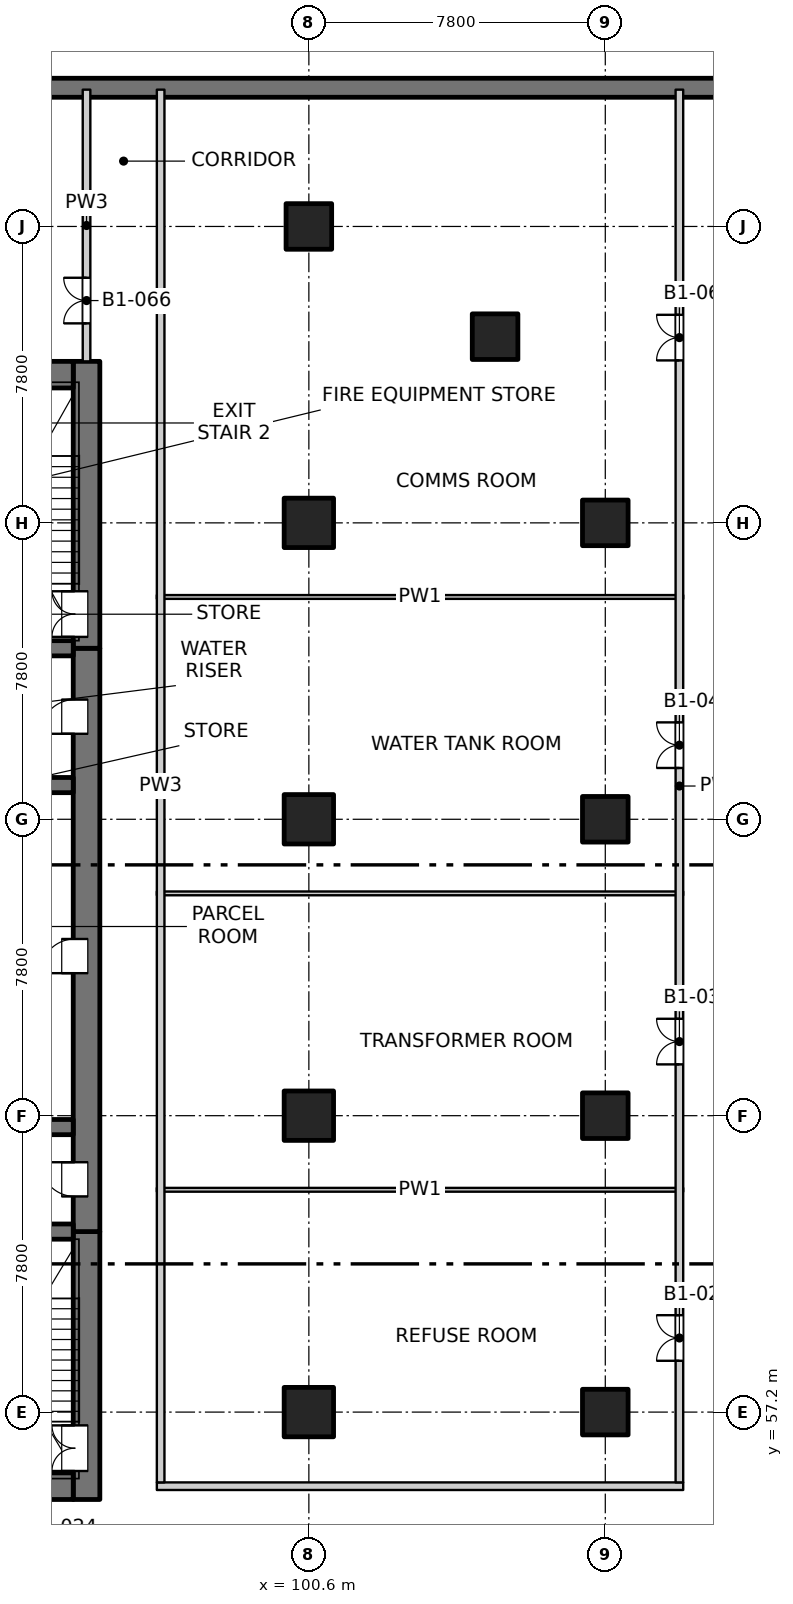
"""IFC4 building model, lengths in metres.
Left out: names, types, materials, properties, quantities, classifications, styles, units other than length and angle.
Written with IfcOpenShell. Run it as: python <this file> out.ifc"""

import sys

from ifc_helpers import new_model, si_unit, direction, frame, frame_2d, origin, origin_2d, place, context, subcontext, project, spatial, rectangle, extrude, element, fill, save


model = new_model("IFC4")
c1 = context("Model", 3, precision=1e-05, world=origin(), true_north=direction((0.0, 1.0)))
c2 = subcontext(c1, "Body", "Model", "MODEL_VIEW")
j1 = project(units=[si_unit("LENGTHUNIT", "METRE"), si_unit("PLANEANGLEUNIT", "RADIAN")], contexts=[c1])
p1 = place(None, origin())
s1 = spatial("IfcSite", under=j1, at=p1, CompositionType="ELEMENT")
p2 = place(p1, origin())
s2 = spatial("IfcBuilding", under=s1, at=p2, CompositionType="ELEMENT")
p3 = place(p2, frame((0.0, 0.0, -4.5)))
s3 = spatial("IfcBuildingStorey", under=s2, at=p3, CompositionType="ELEMENT", Elevation=-4.5)
p4 = place(p3, frame((42.6, 92.05, -0.35), z_axis=(0.0, 0.0, 1.0), x_axis=(1.0, 0.0, 0.0)))
e1 = element("IfcWall", 1, at=p4, inside=s3, PredefinedType="SOLIDWALL", context=c2, shape_type="SweptSolid", body=[
    extrude(rectangle(XDim=84.8, YDim=0.5, at=frame_2d((42.4, 0.0))), origin(), (0.0, 0.0, 1.0), 4.45),
])
for number, where, z_axis, x_axis in (
    (2, (105.5, 85.5, -0.35), (0.0, 0.0, 1.0), (1.0, 0.0, 0.0)),
    (3, (108.4, 57.2, -0.35), (0.0, 0.0, 1.0), (1.0, 0.0, 0.0)),
    (4, (108.4, 65.0, -0.35), (0.0, 0.0, 1.0), (1.0, 0.0, 0.0)),
    (5, (108.4, 72.8, -0.35), (0.0, 0.0, 1.0), (1.0, 0.0, 0.0)),
    (6, (108.4, 80.6, -0.35), (0.0, 0.0, 1.0), (1.0, 0.0, 0.0)),
    (7, (100.6, 88.4, -0.35), (0.0, 0.0, 1.0), (1.0, 0.0, 0.0)),
):
    element("IfcColumn", number, at=place(p3, frame(where, z_axis=z_axis, x_axis=x_axis)), inside=s3, PredefinedType="COLUMN", context=c2, shape_type="SweptSolid", body=[
        extrude(rectangle(XDim=1.2, YDim=1.2, at=origin_2d()), origin(), (0.0, 0.0, 1.0), 4.45),
    ])
for number, where, z_axis, x_axis in (
    (8, (100.6, 57.2, -0.35), (0.0, 0.0, 1.0), (1.0, 0.0, 0.0)),
    (9, (100.6, 65.0, -0.35), (0.0, 0.0, 1.0), (1.0, 0.0, 0.0)),
    (10, (100.6, 72.8, -0.35), (0.0, 0.0, 1.0), (1.0, 0.0, 0.0)),
    (11, (100.6, 80.6, -0.35), (0.0, 0.0, 1.0), (1.0, 0.0, 0.0)),
):
    element("IfcColumn", number, at=place(p3, frame(where, z_axis=z_axis, x_axis=x_axis)), inside=s3, PredefinedType="COLUMN", context=c2, shape_type="SweptSolid", body=[
        extrude(rectangle(XDim=1.3, YDim=1.3, at=origin_2d()), origin(), (0.0, 0.0, 1.0), 4.45),
    ])
p5 = place(p3, frame((94.75, 54.9, -0.35), z_axis=(0.0, 0.0, 1.0), x_axis=(0.0, 1.0, 0.0)))
e12 = element("IfcWall", 12, at=p5, inside=s3, PredefinedType="SOLIDWALL", context=c2, shape_type="SweptSolid", body=[
    extrude(rectangle(XDim=7.05, YDim=0.7, at=frame_2d((3.525, 0.0))), origin(), (0.0, 0.0, 1.0), 4.45),
])
p6 = place(p5, frame((0.75, 0.0, 0.35)))
e13 = element("IfcOpeningElement", 13, at=p6, cuts=e12, PredefinedType="OPENING", context=c2, shape_type="SweptSolid", body=[
    extrude(rectangle(XDim=1.2, YDim=2.1, at=frame_2d((0.6, 1.05))), frame((0.0, 0.36, 0.0), z_axis=(0.0, -1.0, 0.0), x_axis=(1.0, 0.0, 0.0)), (0.0, 0.0, 1.0), 0.72),
])
p7 = place(p3, frame((94.75, 61.95, -0.35), z_axis=(0.0, 0.0, 1.0), x_axis=(0.0, 1.0, 0.0)))
e14 = element("IfcWall", 14, at=p7, inside=s3, PredefinedType="SOLIDWALL", context=c2, shape_type="SweptSolid", body=[
    extrude(rectangle(XDim=15.35, YDim=0.7, at=frame_2d((7.675, 0.0))), origin(), (0.0, 0.0, 1.0), 4.45),
])
p8 = place(p7, frame((0.925, 0.0, 0.35)))
e15 = element("IfcOpeningElement", 15, at=p8, cuts=e14, PredefinedType="OPENING", context=c2, shape_type="SweptSolid", body=[
    extrude(rectangle(XDim=0.9, YDim=2.1, at=frame_2d((0.45, 1.05))), frame((0.0, 0.36, 0.0), z_axis=(0.0, -1.0, 0.0), x_axis=(1.0, 0.0, 0.0)), (0.0, 0.0, 1.0), 0.72),
])
p9 = place(p7, frame((6.8, 0.0, 0.35)))
e16 = element("IfcOpeningElement", 16, at=p9, cuts=e14, PredefinedType="OPENING", context=c2, shape_type="SweptSolid", body=[
    extrude(rectangle(XDim=0.9, YDim=2.1, at=frame_2d((0.45, 1.05))), frame((0.0, 0.36, 0.0), z_axis=(0.0, -1.0, 0.0), x_axis=(1.0, 0.0, 0.0)), (0.0, 0.0, 1.0), 0.72),
])
p10 = place(p7, frame((13.1, 0.0, 0.35)))
e17 = element("IfcOpeningElement", 17, at=p10, cuts=e14, PredefinedType="OPENING", context=c2, shape_type="SweptSolid", body=[
    extrude(rectangle(XDim=0.9, YDim=2.1, at=frame_2d((0.45, 1.05))), frame((0.0, 0.36, 0.0), z_axis=(0.0, -1.0, 0.0), x_axis=(1.0, 0.0, 0.0)), (0.0, 0.0, 1.0), 0.72),
])
p11 = place(p3, frame((94.75, 77.3, -0.35), z_axis=(0.0, 0.0, 1.0), x_axis=(0.0, 1.0, 0.0)))
e18 = element("IfcWall", 18, at=p11, inside=s3, PredefinedType="SOLIDWALL", context=c2, shape_type="SweptSolid", body=[
    extrude(rectangle(XDim=7.55, YDim=0.7, at=frame_2d((3.775, 0.0))), origin(), (0.0, 0.0, 1.0), 4.45),
])
p12 = place(p11, frame((0.3, 0.0, 0.35)))
e19 = element("IfcOpeningElement", 19, at=p12, cuts=e18, PredefinedType="OPENING", context=c2, shape_type="SweptSolid", body=[
    extrude(rectangle(XDim=1.2, YDim=2.1, at=frame_2d((0.6, 1.05))), frame((0.0, 0.36, 0.0), z_axis=(0.0, -1.0, 0.0), x_axis=(1.0, 0.0, 0.0)), (0.0, 0.0, 1.0), 0.72),
])
p13 = place(p3, frame((75.6, 55.25, -0.35), z_axis=(0.0, 0.0, 1.0), x_axis=(1.0, 0.0, 0.0)))
e20 = element("IfcWall", 20, at=p13, inside=s3, PredefinedType="SOLIDWALL", context=c2, shape_type="SweptSolid", body=[
    extrude(rectangle(XDim=18.8, YDim=0.7, at=frame_2d((9.4, 0.0))), origin(), (0.0, 0.0, 1.0), 4.45),
])
p14 = place(p13, frame((8.65, 0.0, 0.35)))
e21 = element("IfcOpeningElement", 21, at=p14, cuts=e20, PredefinedType="OPENING", context=c2, shape_type="SweptSolid", body=[
    extrude(rectangle(XDim=1.5, YDim=2.1, at=frame_2d((0.75, 1.05))), frame((0.0, 0.36, 0.0), z_axis=(0.0, -1.0, 0.0), x_axis=(1.0, 0.0, 0.0)), (0.0, 0.0, 1.0), 0.72),
])
p15 = place(p3, frame((75.6, 84.5, -0.35), z_axis=(0.0, 0.0, 1.0), x_axis=(1.0, 0.0, 0.0)))
e22 = element("IfcWall", 22, at=p15, inside=s3, PredefinedType="SOLIDWALL", context=c2, shape_type="SweptSolid", body=[
    extrude(rectangle(XDim=18.8, YDim=0.7, at=frame_2d((9.4, 0.0))), origin(), (0.0, 0.0, 1.0), 4.45),
])
for number, where, z_axis, x_axis in (
    (23, (90.75, 61.95, -0.35), (0.0, 0.0, 1.0), (1.0, 0.0, 0.0)),
    (24, (90.75, 64.7, -0.35), (0.0, 0.0, 1.0), (1.0, 0.0, 0.0)),
    (25, (90.75, 73.7, -0.35), (0.0, 0.0, 1.0), (1.0, 0.0, 0.0)),
    (26, (90.75, 77.3, -0.35), (0.0, 0.0, 1.0), (1.0, 0.0, 0.0)),
):
    element("IfcWall", number, at=place(p3, frame(where, z_axis=z_axis, x_axis=x_axis)), inside=s3, PredefinedType="SOLIDWALL", context=c2, shape_type="SweptSolid", body=[
        extrude(rectangle(XDim=3.65, YDim=0.4, at=frame_2d((1.825, 0.0))), origin(), (0.0, 0.0, 1.0), 4.45),
    ])
p16 = place(p3, frame((96.6, 55.25, 0.0), z_axis=(0.0, 0.0, 1.0), x_axis=(1.0, 0.0, 0.0)))
e27 = element("IfcWall", 27, at=p16, inside=s3, PredefinedType="PARTITIONING", context=c2, shape_type="SweptSolid", body=[
    extrude(rectangle(XDim=13.85, YDim=0.2, at=frame_2d((6.925, 0.0))), origin(), (0.0, 0.0, 1.0), 4.1),
])
for number, where, z_axis, x_axis in (
    (28, (96.6, 63.05, 0.0), (0.0, 0.0, 1.0), (1.0, 0.0, 0.0)),
    (29, (96.6, 70.85, 0.0), (0.0, 0.0, 1.0), (1.0, 0.0, 0.0)),
    (30, (96.6, 78.65, 0.0), (0.0, 0.0, 1.0), (1.0, 0.0, 0.0)),
):
    element("IfcWall", number, at=place(p3, frame(where, z_axis=z_axis, x_axis=x_axis)), inside=s3, PredefinedType="PARTITIONING", context=c2, shape_type="SweptSolid", body=[
        extrude(rectangle(XDim=13.85, YDim=0.1, at=frame_2d((6.925, 0.0))), origin(), (0.0, 0.0, 1.0), 4.1),
    ])
p17 = place(p3, frame((94.75, 84.85, 0.0), z_axis=(0.0, 0.0, 1.0), x_axis=(0.0, 1.0, 0.0)))
e31 = element("IfcWall", 31, at=p17, inside=s3, PredefinedType="PARTITIONING", context=c2, shape_type="SweptSolid", body=[
    extrude(rectangle(XDim=7.15, YDim=0.2, at=frame_2d((3.575, 0.0))), origin(), (0.0, 0.0, 1.0), 4.1),
])
p18 = place(p17, frame((1.0, 0.0, 0.0)))
e32 = element("IfcOpeningElement", 32, at=p18, cuts=e31, PredefinedType="OPENING", context=c2, shape_type="SweptSolid", body=[
    extrude(rectangle(XDim=1.2, YDim=2.1, at=frame_2d((0.6, 1.05))), frame((0.0, 0.11, 0.0), z_axis=(0.0, -1.0, 0.0), x_axis=(1.0, 0.0, 0.0)), (0.0, 0.0, 1.0), 0.22),
])
p19 = place(p3, frame((96.7, 55.35, 0.0), z_axis=(0.0, 0.0, 1.0), x_axis=(0.0, 1.0, 0.0)))
e33 = element("IfcWall", 33, at=p19, inside=s3, PredefinedType="PARTITIONING", context=c2, shape_type="SweptSolid", body=[
    extrude(rectangle(XDim=36.65, YDim=0.2, at=frame_2d((18.325, 0.0))), origin(), (0.0, 0.0, 1.0), 4.1),
])
p20 = place(p3, frame((110.35, 55.35, 0.0), z_axis=(0.0, 0.0, 1.0), x_axis=(0.0, 1.0, 0.0)))
e34 = element("IfcWall", 34, at=p20, inside=s3, PredefinedType="PARTITIONING", context=c2, shape_type="SweptSolid", body=[
    extrude(rectangle(XDim=36.65, YDim=0.2, at=frame_2d((18.325, 0.0))), origin(), (0.0, 0.0, 1.0), 4.1),
])
p21 = place(p20, frame((3.2, 0.0, 0.0)))
e35 = element("IfcOpeningElement", 35, at=p21, cuts=e34, PredefinedType="OPENING", context=c2, shape_type="SweptSolid", body=[
    extrude(rectangle(XDim=1.2, YDim=2.1, at=frame_2d((0.6, 1.05))), frame((0.0, 0.11, 0.0), z_axis=(0.0, -1.0, 0.0), x_axis=(1.0, 0.0, 0.0)), (0.0, 0.0, 1.0), 0.22),
])
p22 = place(p20, frame((11.0, 0.0, 0.0)))
e36 = element("IfcOpeningElement", 36, at=p22, cuts=e34, PredefinedType="OPENING", context=c2, shape_type="SweptSolid", body=[
    extrude(rectangle(XDim=1.2, YDim=2.1, at=frame_2d((0.6, 1.05))), frame((0.0, 0.11, 0.0), z_axis=(0.0, -1.0, 0.0), x_axis=(1.0, 0.0, 0.0)), (0.0, 0.0, 1.0), 0.22),
])
p23 = place(p20, frame((18.8, 0.0, 0.0)))
e37 = element("IfcOpeningElement", 37, at=p23, cuts=e34, PredefinedType="OPENING", context=c2, shape_type="SweptSolid", body=[
    extrude(rectangle(XDim=1.2, YDim=2.1, at=frame_2d((0.6, 1.05))), frame((0.0, 0.11, 0.0), z_axis=(0.0, -1.0, 0.0), x_axis=(1.0, 0.0, 0.0)), (0.0, 0.0, 1.0), 0.22),
])
p24 = place(p20, frame((29.525, 0.0, 0.0)))
e38 = element("IfcOpeningElement", 38, at=p24, cuts=e34, PredefinedType="OPENING", context=c2, shape_type="SweptSolid", body=[
    extrude(rectangle(XDim=1.2, YDim=2.1, at=frame_2d((0.6, 1.05))), frame((0.0, 0.11, 0.0), z_axis=(0.0, -1.0, 0.0), x_axis=(1.0, 0.0, 0.0)), (0.0, 0.0, 1.0), 0.22),
])
p25 = place(p6, origin())
e39 = element("IfcDoor", 39, at=p25, inside=s3, OperationType="DOUBLE_DOOR_SINGLE_SWING", PredefinedType="DOOR", context=c2, shape_type="SweptSolid", body=[
    extrude(rectangle(XDim=1.2, YDim=2.1, at=frame_2d((0.6, 1.05))), frame((0.0, 0.335, 0.0), z_axis=(0.0, -1.0, 0.0), x_axis=(1.0, 0.0, 0.0)), (0.0, 0.0, 1.0), 0.05),
])
fill(e13, e39)
p26 = place(p21, origin())
e40 = element("IfcDoor", 40, at=p26, inside=s3, OperationType="DOUBLE_DOOR_SINGLE_SWING", PredefinedType="DOOR", context=c2, shape_type="SweptSolid", body=[
    extrude(rectangle(XDim=1.2, YDim=2.1, at=frame_2d((0.6, 1.05))), frame((0.0, 0.025, 0.0), z_axis=(0.0, -1.0, 0.0), x_axis=(1.0, 0.0, 0.0)), (0.0, 0.0, 1.0), 0.05),
])
fill(e35, e40)
p27 = place(p8, origin())
e41 = element("IfcDoor", 41, at=p27, inside=s3, OperationType="SINGLE_SWING_RIGHT", PredefinedType="DOOR", context=c2, shape_type="SweptSolid", body=[
    extrude(rectangle(XDim=0.9, YDim=2.1, at=frame_2d((0.45, 1.05))), frame((0.0, 0.335, 0.0), z_axis=(0.0, -1.0, 0.0), x_axis=(1.0, 0.0, 0.0)), (0.0, 0.0, 1.0), 0.05),
])
fill(e15, e41)
p28 = place(p22, origin())
e42 = element("IfcDoor", 42, at=p28, inside=s3, OperationType="DOUBLE_DOOR_SINGLE_SWING", PredefinedType="DOOR", context=c2, shape_type="SweptSolid", body=[
    extrude(rectangle(XDim=1.2, YDim=2.1, at=frame_2d((0.6, 1.05))), frame((0.0, 0.025, 0.0), z_axis=(0.0, -1.0, 0.0), x_axis=(1.0, 0.0, 0.0)), (0.0, 0.0, 1.0), 0.05),
])
fill(e36, e42)
p29 = place(p9, origin())
e43 = element("IfcDoor", 43, at=p29, inside=s3, OperationType="SINGLE_SWING_LEFT", PredefinedType="DOOR", context=c2, shape_type="SweptSolid", body=[
    extrude(rectangle(XDim=0.9, YDim=2.1, at=frame_2d((0.45, 1.05))), frame((0.0, 0.335, 0.0), z_axis=(0.0, -1.0, 0.0), x_axis=(1.0, 0.0, 0.0)), (0.0, 0.0, 1.0), 0.05),
])
fill(e16, e43)
p30 = place(p23, origin())
e44 = element("IfcDoor", 44, at=p30, inside=s3, OperationType="DOUBLE_DOOR_SINGLE_SWING", PredefinedType="DOOR", context=c2, shape_type="SweptSolid", body=[
    extrude(rectangle(XDim=1.2, YDim=2.1, at=frame_2d((0.6, 1.05))), frame((0.0, 0.025, 0.0), z_axis=(0.0, -1.0, 0.0), x_axis=(1.0, 0.0, 0.0)), (0.0, 0.0, 1.0), 0.05),
])
fill(e37, e44)
p31 = place(p10, origin())
e45 = element("IfcDoor", 45, at=p31, inside=s3, OperationType="SINGLE_SWING_LEFT", PredefinedType="DOOR", context=c2, shape_type="SweptSolid", body=[
    extrude(rectangle(XDim=0.9, YDim=2.1, at=frame_2d((0.45, 1.05))), frame((0.0, 0.335, 0.0), z_axis=(0.0, -1.0, 0.0), x_axis=(1.0, 0.0, 0.0)), (0.0, 0.0, 1.0), 0.05),
])
fill(e17, e45)
p32 = place(p12, origin())
e46 = element("IfcDoor", 46, at=p32, inside=s3, OperationType="DOUBLE_DOOR_SINGLE_SWING", PredefinedType="DOOR", context=c2, shape_type="SweptSolid", body=[
    extrude(rectangle(XDim=1.2, YDim=2.1, at=frame_2d((0.6, 1.05))), frame((0.0, 0.335, 0.0), z_axis=(0.0, -1.0, 0.0), x_axis=(1.0, 0.0, 0.0)), (0.0, 0.0, 1.0), 0.05),
])
fill(e19, e46)
p33 = place(p24, origin())
e47 = element("IfcDoor", 47, at=p33, inside=s3, OperationType="DOUBLE_DOOR_SINGLE_SWING", PredefinedType="DOOR", context=c2, shape_type="SweptSolid", body=[
    extrude(rectangle(XDim=1.2, YDim=2.1, at=frame_2d((0.6, 1.05))), frame((0.0, 0.025, 0.0), z_axis=(0.0, -1.0, 0.0), x_axis=(1.0, 0.0, 0.0)), (0.0, 0.0, 1.0), 0.05),
])
fill(e38, e47)
p34 = place(p18, origin())
e48 = element("IfcDoor", 48, at=p34, inside=s3, OperationType="DOUBLE_DOOR_SINGLE_SWING", PredefinedType="DOOR", context=c2, shape_type="SweptSolid", body=[
    extrude(rectangle(XDim=1.2, YDim=2.1, at=frame_2d((0.6, 1.05))), frame((0.0, 0.025, 0.0), z_axis=(0.0, -1.0, 0.0), x_axis=(1.0, 0.0, 0.0)), (0.0, 0.0, 1.0), 0.05),
])
fill(e32, e48)
save(model, sys.argv[1])
